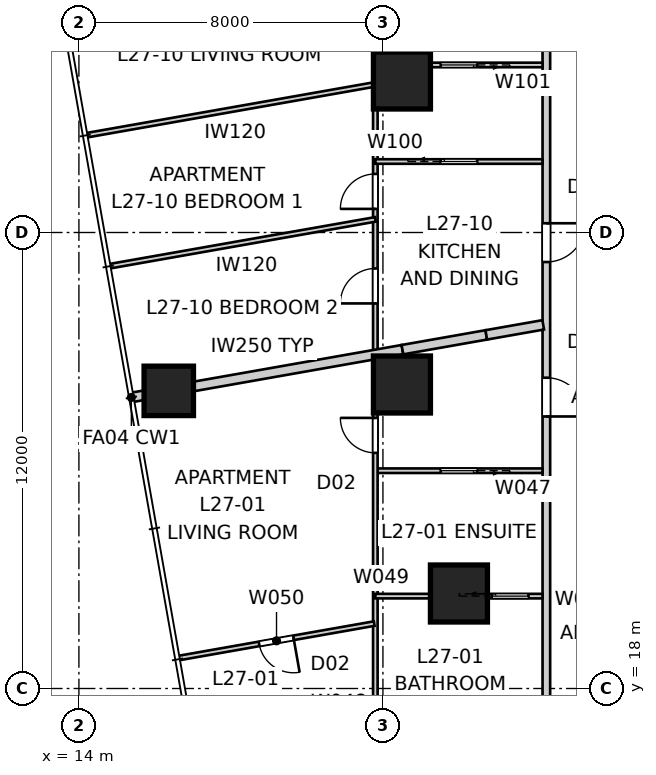
"""IFC4 building model, lengths in metres.
Left out: names, types, materials, properties, quantities, classifications, styles, units other than length and angle.
Written with IfcOpenShell. Run it as: python <this file> out.ifc"""

import sys

from ifc_helpers import new_model, si_unit, direction, frame, frame_2d, origin, origin_2d, place, context, subcontext, project, spatial, rectangle, extrude, element, fill, save


model = new_model("IFC4")
c1 = context("Model", 3, precision=1e-05, world=origin(), true_north=direction((0.0, 1.0)))
c2 = subcontext(c1, "Body", "Model", "MODEL_VIEW")
j1 = project(units=[si_unit("LENGTHUNIT", "METRE"), si_unit("PLANEANGLEUNIT", "RADIAN")], contexts=[c1])
p1 = place(None, origin())
s1 = spatial("IfcSite", under=j1, at=p1, CompositionType="ELEMENT")
p2 = place(p1, origin())
s2 = spatial("IfcBuilding", under=s1, at=p2, CompositionType="ELEMENT")
p3 = place(p2, frame((0.0, 0.0, 99.8)))
s3 = spatial("IfcBuildingStorey", under=s2, at=p3, CompositionType="ELEMENT", Elevation=99.8)
p4 = place(p3, frame((16.365, 25.833, 0.0), z_axis=(0.0, 0.0, 1.0), x_axis=(1.0, 0.0, 0.0)))
e1 = element("IfcColumn", 1, at=p4, inside=s3, PredefinedType="COLUMN", context=c2, shape_type="SweptSolid", body=[
    extrude(rectangle(XDim=1.3, YDim=1.3, at=origin_2d()), origin(), (0.0, 0.0, 1.0), 3.4),
])
for number, where, z_axis, x_axis in (
    (2, (22.5, 34.0, 0.0), (0.0, 0.0, 1.0), (1.0, 0.0, 0.0)),
    (3, (22.5, 26.0, 0.0), (0.0, 0.0, 1.0), (1.0, 0.0, 0.0)),
    (4, (24.0, 20.5, 0.0), (0.0, 0.0, 1.0), (1.0, 0.0, 0.0)),
):
    element("IfcColumn", number, at=place(p3, frame(where, z_axis=z_axis, x_axis=x_axis)), inside=s3, PredefinedType="COLUMN", context=c2, shape_type="SweptSolid", body=[
        extrude(rectangle(XDim=1.5, YDim=1.5, at=origin_2d()), origin(), (0.0, 0.0, 1.0), 3.4),
    ])
p5 = place(p3, frame((26.3, 44.5, 0.0), z_axis=(0.0, 0.0, 1.0), x_axis=(0.0, -1.0, 0.0)))
e5 = element("IfcWall", 5, at=p5, inside=s3, PredefinedType="PARTITIONING", context=c2, shape_type="SweptSolid", body=[
    extrude(rectangle(XDim=29.0, YDim=0.2, at=frame_2d((14.5, 0.0))), origin(), (0.0, 0.0, 1.0), 3.25),
])
p6 = place(p5, frame((14.257, 0.0, 0.0)))
e6 = element("IfcOpeningElement", 6, at=p6, cuts=e5, PredefinedType="OPENING", context=c2, shape_type="SweptSolid", body=[
    extrude(rectangle(XDim=1.02, YDim=2.34, at=frame_2d((0.51, 1.17))), frame((0.0, 0.11, 0.0), z_axis=(0.0, -1.0, 0.0), x_axis=(1.0, 0.0, 0.0)), (0.0, 0.0, 1.0), 0.22),
])
p7 = place(p5, frame((18.322, 0.0, 0.0)))
e7 = element("IfcOpeningElement", 7, at=p7, cuts=e5, PredefinedType="OPENING", context=c2, shape_type="SweptSolid", body=[
    extrude(rectangle(XDim=1.02, YDim=2.34, at=frame_2d((0.51, 1.17))), frame((0.0, 0.11, 0.0), z_axis=(0.0, -1.0, 0.0), x_axis=(1.0, 0.0, 0.0)), (0.0, 0.0, 1.0), 0.22),
])
p8 = place(p5, frame((3.963, 0.0, 0.0)))
e8 = element("IfcOpeningElement", 8, at=p8, cuts=e5, PredefinedType="OPENING", context=c2, shape_type="SweptSolid", body=[
    extrude(rectangle(XDim=1.02, YDim=2.34, at=frame_2d((0.51, 1.17))), frame((0.0, 0.11, 0.0), z_axis=(0.0, -1.0, 0.0), x_axis=(1.0, 0.0, 0.0)), (0.0, 0.0, 1.0), 0.22),
])
p9 = place(p3, frame((15.38, 25.659, 0.0), z_axis=(0.0, 0.0, 1.0), x_axis=(0.984802553948, 0.173677660443, 0.0)))
e9 = element("IfcWall", 9, at=p9, inside=s3, PredefinedType="PARTITIONING", context=c2, shape_type="SweptSolid", body=[
    extrude(rectangle(XDim=7.244, YDim=0.25, at=frame_2d((3.622, 0.0))), origin(), (0.0, 0.0, 1.0), 3.25),
])
p10 = place(p3, frame((22.513, 26.917, 0.0), z_axis=(0.0, 0.0, 1.0), x_axis=(0.984809882944, 0.17363609779, 0.0)))
e10 = element("IfcWall", 10, at=p10, inside=s3, PredefinedType="PARTITIONING", context=c2, shape_type="SweptSolid", body=[
    extrude(rectangle(XDim=2.24, YDim=0.25, at=frame_2d((1.12, 0.0))), origin(), (0.0, 0.0, 1.0), 2.795),
])
p11 = place(p3, frame((24.719, 27.306, 0.0), z_axis=(0.0, 0.0, 1.0), x_axis=(0.984815846312, 0.173602272028, 0.0)))
e11 = element("IfcWall", 11, at=p11, inside=s3, PredefinedType="PARTITIONING", context=c2, shape_type="SweptSolid", body=[
    extrude(rectangle(XDim=1.522, YDim=0.25, at=frame_2d((0.761, 0.0))), origin(), (0.0, 0.0, 1.0), 3.25),
])
p12 = place(p3, frame((26.2, 23.731, 0.0), z_axis=(0.0, 0.0, 1.0), x_axis=(-1.0, 0.0, 0.0)))
e12 = element("IfcWall", 12, at=p12, inside=s3, PredefinedType="PARTITIONING", context=c2, shape_type="SweptSolid", body=[
    extrude(rectangle(XDim=4.4, YDim=0.12, at=frame_2d((2.2, 0.0))), origin(), (0.0, 0.0, 1.0), 3.25),
])
p13 = place(p12, frame((1.72, 0.0, 0.0)))
e13 = element("IfcOpeningElement", 13, at=p13, cuts=e12, PredefinedType="OPENING", context=c2, shape_type="SweptSolid", body=[
    extrude(rectangle(XDim=0.96, YDim=2.1, at=frame_2d((0.48, 1.05))), frame((0.0, 0.07, 0.0), z_axis=(0.0, -1.0, 0.0), x_axis=(1.0, 0.0, 0.0)), (0.0, 0.0, 1.0), 0.14),
])
p14 = place(p3, frame((21.8, 11.8, 0.0), z_axis=(0.0, 0.0, 1.0), x_axis=(0.0, 1.0, 0.0)))
e14 = element("IfcWall", 14, at=p14, inside=s3, PredefinedType="PARTITIONING", context=c2, shape_type="SweptSolid", body=[
    extrude(rectangle(XDim=25.653, YDim=0.12, at=frame_2d((12.826, 0.0))), origin(), (0.0, 0.0, 1.0), 3.25),
])
p15 = place(p14, frame((16.333, 0.0, 0.0)))
e15 = element("IfcOpeningElement", 15, at=p15, cuts=e14, PredefinedType="OPENING", context=c2, shape_type="SweptSolid", body=[
    extrude(rectangle(XDim=0.92, YDim=2.34, at=frame_2d((0.46, 1.17))), frame((0.0, 0.07, 0.0), z_axis=(0.0, -1.0, 0.0), x_axis=(1.0, 0.0, 0.0)), (0.0, 0.0, 1.0), 0.14),
])
p16 = place(p14, frame((18.821, 0.0, 0.0)))
e16 = element("IfcOpeningElement", 16, at=p16, cuts=e14, PredefinedType="OPENING", context=c2, shape_type="SweptSolid", body=[
    extrude(rectangle(XDim=0.92, YDim=2.34, at=frame_2d((0.46, 1.17))), frame((0.0, 0.07, 0.0), z_axis=(0.0, -1.0, 0.0), x_axis=(1.0, 0.0, 0.0)), (0.0, 0.0, 1.0), 0.14),
])
p17 = place(p14, frame((12.401, 0.0, 0.0)))
e17 = element("IfcOpeningElement", 17, at=p17, cuts=e14, PredefinedType="OPENING", context=c2, shape_type="SweptSolid", body=[
    extrude(rectangle(XDim=0.92, YDim=2.34, at=frame_2d((0.46, 1.17))), frame((0.0, 0.07, 0.0), z_axis=(0.0, -1.0, 0.0), x_axis=(1.0, 0.0, 0.0)), (0.0, 0.0, 1.0), 0.14),
])
p18 = place(p14, frame((2.066, 0.0, 0.0)))
e18 = element("IfcOpeningElement", 18, at=p18, cuts=e14, PredefinedType="OPENING", context=c2, shape_type="SweptSolid", body=[
    extrude(rectangle(XDim=0.92, YDim=2.34, at=frame_2d((0.46, 1.17))), frame((0.0, 0.07, 0.0), z_axis=(0.0, -1.0, 0.0), x_axis=(1.0, 0.0, 0.0)), (0.0, 0.0, 1.0), 0.14),
])
p19 = place(p14, frame((23.651, 0.0, 0.0)))
e19 = element("IfcOpeningElement", 19, at=p19, cuts=e14, PredefinedType="OPENING", context=c2, shape_type="SweptSolid", body=[
    extrude(rectangle(XDim=0.96, YDim=2.1, at=frame_2d((0.48, 1.05))), frame((0.0, 0.07, 0.0), z_axis=(0.0, -1.0, 0.0), x_axis=(1.0, 0.0, 0.0)), (0.0, 0.0, 1.0), 0.14),
])
p20 = place(p3, frame((21.8, 20.431, 0.0), z_axis=(0.0, 0.0, 1.0), x_axis=(1.0, 0.0, 0.0)))
e20 = element("IfcWall", 20, at=p20, inside=s3, PredefinedType="PARTITIONING", context=c2, shape_type="SweptSolid", body=[
    extrude(rectangle(XDim=4.4, YDim=0.12, at=frame_2d((2.2, 0.0))), origin(), (0.0, 0.0, 1.0), 3.25),
])
p21 = place(p20, frame((3.07, 0.0, 0.0)))
e21 = element("IfcOpeningElement", 21, at=p21, cuts=e20, PredefinedType="OPENING", context=c2, shape_type="SweptSolid", body=[
    extrude(rectangle(XDim=0.96, YDim=2.1, at=frame_2d((0.48, 1.05))), frame((0.0, 0.07, 0.0), z_axis=(0.0, -1.0, 0.0), x_axis=(1.0, 0.0, 0.0)), (0.0, 0.0, 1.0), 0.14),
])
p22 = place(p3, frame((21.77, 19.708, 0.0), z_axis=(0.0, 0.0, 1.0), x_axis=(-0.984812268581, -0.173622566657, 0.0)))
e22 = element("IfcWall", 22, at=p22, inside=s3, PredefinedType="PARTITIONING", context=c2, shape_type="SweptSolid", body=[
    extrude(rectangle(XDim=5.22, YDim=0.12, at=frame_2d((2.61, 0.0))), origin(), (0.0, 0.0, 1.0), 3.25),
])
p23 = place(p22, frame((2.155, 0.0, 0.0)))
e23 = element("IfcOpeningElement", 23, at=p23, cuts=e22, PredefinedType="OPENING", context=c2, shape_type="SweptSolid", body=[
    extrude(rectangle(XDim=0.92, YDim=2.34, at=frame_2d((0.46, 1.17))), frame((0.0, 0.07, 0.0), z_axis=(0.0, -1.0, 0.0), x_axis=(1.0, 0.0, 0.0)), (0.0, 0.0, 1.0), 0.14),
])
p24 = place(p3, frame((21.8, 31.868, 0.0), z_axis=(0.0, 0.0, 1.0), x_axis=(1.0, 0.0, 0.0)))
e24 = element("IfcWall", 24, at=p24, inside=s3, PredefinedType="PARTITIONING", context=c2, shape_type="SweptSolid", body=[
    extrude(rectangle(XDim=4.4, YDim=0.12, at=frame_2d((2.2, 0.0))), origin(), (0.0, 0.0, 1.0), 3.25),
])
p25 = place(p24, frame((1.72, 0.0, 0.0)))
e25 = element("IfcOpeningElement", 25, at=p25, cuts=e24, PredefinedType="OPENING", context=c2, shape_type="SweptSolid", body=[
    extrude(rectangle(XDim=0.96, YDim=2.1, at=frame_2d((0.48, 1.05))), frame((0.0, 0.07, 0.0), z_axis=(0.0, -1.0, 0.0), x_axis=(1.0, 0.0, 0.0)), (0.0, 0.0, 1.0), 0.14),
])
p26 = place(p3, frame((26.2, 34.409, 0.0), z_axis=(0.0, 0.0, 1.0), x_axis=(-1.0, 0.0, 0.0)))
e26 = element("IfcWall", 26, at=p26, inside=s3, PredefinedType="PARTITIONING", context=c2, shape_type="SweptSolid", body=[
    extrude(rectangle(XDim=4.4, YDim=0.12, at=frame_2d((2.2, 0.0))), origin(), (0.0, 0.0, 1.0), 3.25),
])
p27 = place(p26, frame((1.72, 0.0, 0.0)))
e27 = element("IfcOpeningElement", 27, at=p27, cuts=e26, PredefinedType="OPENING", context=c2, shape_type="SweptSolid", body=[
    extrude(rectangle(XDim=0.96, YDim=2.1, at=frame_2d((0.48, 1.05))), frame((0.0, 0.07, 0.0), z_axis=(0.0, -1.0, 0.0), x_axis=(1.0, 0.0, 0.0)), (0.0, 0.0, 1.0), 0.14),
])
p28 = place(p3, frame((21.8, 33.899, 0.0), z_axis=(0.0, 0.0, 1.0), x_axis=(-0.984804581119, -0.173666165406, 0.0)))
e28 = element("IfcWall", 28, at=p28, inside=s3, PredefinedType="PARTITIONING", context=c2, shape_type="SweptSolid", body=[
    extrude(rectangle(XDim=7.714, YDim=0.12, at=frame_2d((3.857, 0.0))), origin(), (0.0, 0.0, 1.0), 3.25),
])
p29 = place(p3, frame((21.8, 30.345, 0.0), z_axis=(0.0, 0.0, 1.0), x_axis=(-0.984809869921, -0.17363617165, 0.0)))
e29 = element("IfcWall", 29, at=p29, inside=s3, PredefinedType="PARTITIONING", context=c2, shape_type="SweptSolid", body=[
    extrude(rectangle(XDim=7.096, YDim=0.12, at=frame_2d((3.548, 0.0))), origin(), (0.0, 0.0, 1.0), 3.25),
])
p30 = place(p6, origin())
e30 = element("IfcDoor", 30, at=p30, inside=s3, OperationType="SINGLE_SWING_LEFT", PredefinedType="DOOR", context=c2, shape_type="SweptSolid", body=[
    extrude(rectangle(XDim=1.02, YDim=2.34, at=frame_2d((0.51, 1.17))), frame((0.0, 0.025, 0.0), z_axis=(0.0, -1.0, 0.0), x_axis=(1.0, 0.0, 0.0)), (0.0, 0.0, 1.0), 0.05),
])
fill(e6, e30)
p31 = place(p7, origin())
e31 = element("IfcDoor", 31, at=p31, inside=s3, OperationType="SINGLE_SWING_RIGHT", PredefinedType="DOOR", context=c2, shape_type="SweptSolid", body=[
    extrude(rectangle(XDim=1.02, YDim=2.34, at=frame_2d((0.51, 1.17))), frame((0.0, 0.025, 0.0), z_axis=(0.0, -1.0, 0.0), x_axis=(1.0, 0.0, 0.0)), (0.0, 0.0, 1.0), 0.05),
])
fill(e7, e31)
p32 = place(p25, origin())
e32 = element("IfcDoor", 32, at=p32, inside=s3, OperationType="SLIDING_TO_LEFT", PredefinedType="DOOR", context=c2, shape_type="SweptSolid", body=[
    extrude(rectangle(XDim=0.96, YDim=2.1, at=frame_2d((0.48, 1.05))), frame((0.0, 0.025, 0.0), z_axis=(0.0, -1.0, 0.0), x_axis=(1.0, 0.0, 0.0)), (0.0, 0.0, 1.0), 0.05),
])
fill(e25, e32)
p33 = place(p15, origin())
e33 = element("IfcDoor", 33, at=p33, inside=s3, OperationType="SINGLE_SWING_LEFT", PredefinedType="DOOR", context=c2, shape_type="SweptSolid", body=[
    extrude(rectangle(XDim=0.92, YDim=2.34, at=frame_2d((0.46, 1.17))), frame((0.0, 0.025, 0.0), z_axis=(0.0, -1.0, 0.0), x_axis=(1.0, 0.0, 0.0)), (0.0, 0.0, 1.0), 0.05),
])
fill(e15, e33)
p34 = place(p16, origin())
e34 = element("IfcDoor", 34, at=p34, inside=s3, OperationType="SINGLE_SWING_LEFT", PredefinedType="DOOR", context=c2, shape_type="SweptSolid", body=[
    extrude(rectangle(XDim=0.92, YDim=2.34, at=frame_2d((0.46, 1.17))), frame((0.0, 0.025, 0.0), z_axis=(0.0, -1.0, 0.0), x_axis=(1.0, 0.0, 0.0)), (0.0, 0.0, 1.0), 0.05),
])
fill(e16, e34)
p35 = place(p13, origin())
e35 = element("IfcDoor", 35, at=p35, inside=s3, OperationType="SLIDING_TO_LEFT", PredefinedType="DOOR", context=c2, shape_type="SweptSolid", body=[
    extrude(rectangle(XDim=0.96, YDim=2.1, at=frame_2d((0.48, 1.05))), frame((0.0, 0.025, 0.0), z_axis=(0.0, -1.0, 0.0), x_axis=(1.0, 0.0, 0.0)), (0.0, 0.0, 1.0), 0.05),
])
fill(e13, e35)
p36 = place(p17, origin())
e36 = element("IfcDoor", 36, at=p36, inside=s3, OperationType="SINGLE_SWING_RIGHT", PredefinedType="DOOR", context=c2, shape_type="SweptSolid", body=[
    extrude(rectangle(XDim=0.92, YDim=2.34, at=frame_2d((0.46, 1.17))), frame((0.0, 0.025, 0.0), z_axis=(0.0, -1.0, 0.0), x_axis=(1.0, 0.0, 0.0)), (0.0, 0.0, 1.0), 0.05),
])
fill(e17, e36)
p37 = place(p27, origin())
e37 = element("IfcDoor", 37, at=p37, inside=s3, OperationType="SLIDING_TO_LEFT", PredefinedType="DOOR", context=c2, shape_type="SweptSolid", body=[
    extrude(rectangle(XDim=0.96, YDim=2.1, at=frame_2d((0.48, 1.05))), frame((0.0, 0.025, 0.0), z_axis=(0.0, -1.0, 0.0), x_axis=(1.0, 0.0, 0.0)), (0.0, 0.0, 1.0), 0.05),
])
fill(e27, e37)
p38 = place(p21, origin())
e38 = element("IfcDoor", 38, at=p38, inside=s3, OperationType="SLIDING_TO_LEFT", PredefinedType="DOOR", context=c2, shape_type="SweptSolid", body=[
    extrude(rectangle(XDim=0.96, YDim=2.1, at=frame_2d((0.48, 1.05))), frame((0.0, 0.025, 0.0), z_axis=(0.0, -1.0, 0.0), x_axis=(1.0, 0.0, 0.0)), (0.0, 0.0, 1.0), 0.05),
])
fill(e21, e38)
p39 = place(p23, origin())
e39 = element("IfcDoor", 39, at=p39, inside=s3, OperationType="SINGLE_SWING_LEFT", PredefinedType="DOOR", context=c2, shape_type="SweptSolid", body=[
    extrude(rectangle(XDim=0.92, YDim=2.34, at=frame_2d((0.46, 1.17))), frame((0.0, 0.025, 0.0), z_axis=(0.0, -1.0, 0.0), x_axis=(1.0, 0.0, 0.0)), (0.0, 0.0, 1.0), 0.05),
])
fill(e23, e39)
save(model, sys.argv[1])
